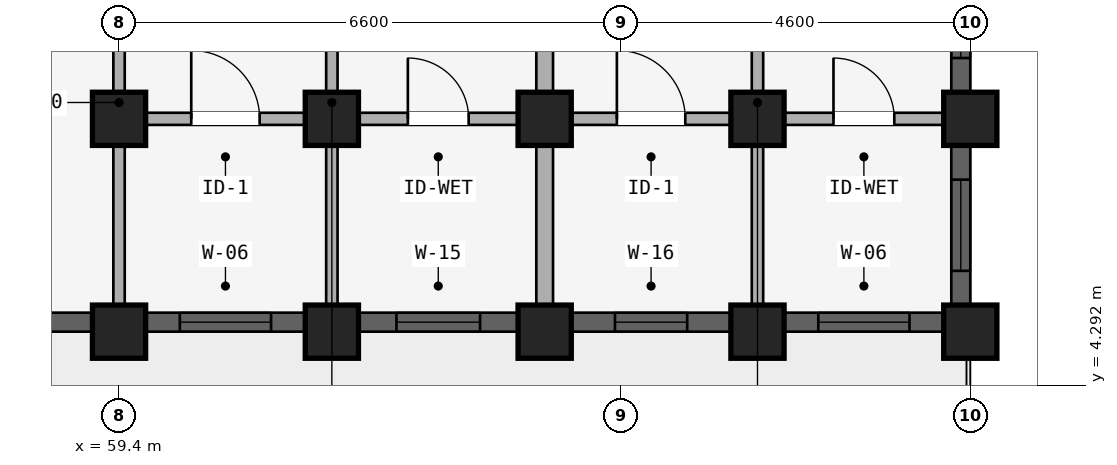
"""IFC4 building model, lengths in metres.
Left out: names, types, materials, properties, quantities, classifications, styles, units other than length and angle.
Written with IfcOpenShell. Run it as: python <this file> out.ifc"""

import sys

from ifc_helpers import new_model, si_unit, direction, frame, frame_2d, origin, origin_2d, place, context, subcontext, project, spatial, rectangle, extrude, element, fill, save


model = new_model("IFC4")
c1 = context("Model", 3, precision=1e-05, world=origin(), true_north=direction((0.0, 1.0)))
c2 = subcontext(c1, "Body", "Model", "MODEL_VIEW")
j1 = project(units=[si_unit("LENGTHUNIT", "METRE"), si_unit("PLANEANGLEUNIT", "RADIAN")], contexts=[c1])
p1 = place(None, origin())
s1 = spatial("IfcSite", under=j1, at=p1, CompositionType="ELEMENT")
p2 = place(p1, origin())
s2 = spatial("IfcBuilding", under=s1, at=p2, CompositionType="ELEMENT")
p3 = place(p2, frame((0.0, 0.0, 21.3)))
s3 = spatial("IfcBuildingStorey", under=s2, at=p3, CompositionType="ELEMENT", Elevation=21.3)
p4 = place(p3, frame((59.4, 7.8, 0.0), z_axis=(0.0, 0.0, 1.0), x_axis=(1.0, 0.0, 0.0)))
e1 = element("IfcColumn", 1, at=p4, inside=s3, PredefinedType="COLUMN", context=c2, shape_type="SweptSolid", body=[
    extrude(rectangle(XDim=0.7, YDim=0.7, at=origin_2d()), origin(), (0.0, 0.0, 1.0), 2.93),
])
p5 = place(p3, frame((59.4, 5.0, 0.0), z_axis=(0.0, 0.0, 1.0), x_axis=(1.0, 0.0, 0.0)))
e2 = element("IfcColumn", 2, at=p5, inside=s3, PredefinedType="COLUMN", context=c2, shape_type="SweptSolid", body=[
    extrude(rectangle(XDim=0.7, YDim=0.7, at=origin_2d()), origin(), (0.0, 0.0, 1.0), 2.97),
])
p6 = place(p3, frame((62.2, 7.8, 0.0), z_axis=(0.0, 0.0, 1.0), x_axis=(1.0, 0.0, 0.0)))
e3 = element("IfcColumn", 3, at=p6, inside=s3, PredefinedType="COLUMN", context=c2, shape_type="SweptSolid", body=[
    extrude(rectangle(XDim=0.7, YDim=0.7, at=origin_2d()), origin(), (0.0, 0.0, 1.0), 2.93),
])
p7 = place(p3, frame((62.2, 5.0, 0.0), z_axis=(0.0, 0.0, 1.0), x_axis=(1.0, 0.0, 0.0)))
e4 = element("IfcColumn", 4, at=p7, inside=s3, PredefinedType="COLUMN", context=c2, shape_type="SweptSolid", body=[
    extrude(rectangle(XDim=0.7, YDim=0.7, at=origin_2d()), origin(), (0.0, 0.0, 1.0), 2.97),
])
p8 = place(p3, frame((65.0, 7.8, 0.0), z_axis=(0.0, 0.0, 1.0), x_axis=(1.0, 0.0, 0.0)))
e5 = element("IfcColumn", 5, at=p8, inside=s3, PredefinedType="COLUMN", context=c2, shape_type="SweptSolid", body=[
    extrude(rectangle(XDim=0.7, YDim=0.7, at=origin_2d()), origin(), (0.0, 0.0, 1.0), 2.93),
])
p9 = place(p3, frame((65.0, 5.0, 0.0), z_axis=(0.0, 0.0, 1.0), x_axis=(1.0, 0.0, 0.0)))
e6 = element("IfcColumn", 6, at=p9, inside=s3, PredefinedType="COLUMN", context=c2, shape_type="SweptSolid", body=[
    extrude(rectangle(XDim=0.7, YDim=0.7, at=origin_2d()), origin(), (0.0, 0.0, 1.0), 2.97),
])
p10 = place(p3, frame((67.8, 7.8, 0.0), z_axis=(0.0, 0.0, 1.0), x_axis=(1.0, 0.0, 0.0)))
e7 = element("IfcColumn", 7, at=p10, inside=s3, PredefinedType="COLUMN", context=c2, shape_type="SweptSolid", body=[
    extrude(rectangle(XDim=0.7, YDim=0.7, at=origin_2d()), origin(), (0.0, 0.0, 1.0), 2.93),
])
p11 = place(p3, frame((67.8, 5.0, 0.0), z_axis=(0.0, 0.0, 1.0), x_axis=(1.0, 0.0, 0.0)))
e8 = element("IfcColumn", 8, at=p11, inside=s3, PredefinedType="COLUMN", context=c2, shape_type="SweptSolid", body=[
    extrude(rectangle(XDim=0.7, YDim=0.7, at=origin_2d()), origin(), (0.0, 0.0, 1.0), 2.97),
])
p12 = place(p3, frame((70.6, 7.8, 0.0), z_axis=(0.0, 0.0, 1.0), x_axis=(1.0, 0.0, 0.0)))
e9 = element("IfcColumn", 9, at=p12, inside=s3, PredefinedType="COLUMN", context=c2, shape_type="SweptSolid", body=[
    extrude(rectangle(XDim=0.7, YDim=0.7, at=origin_2d()), origin(), (0.0, 0.0, 1.0), 2.93),
])
p13 = place(p3, frame((70.6, 5.0, 0.0), z_axis=(0.0, 0.0, 1.0), x_axis=(1.0, 0.0, 0.0)))
e10 = element("IfcColumn", 10, at=p13, inside=s3, PredefinedType="COLUMN", context=c2, shape_type="SweptSolid", body=[
    extrude(rectangle(XDim=0.7, YDim=0.7, at=origin_2d()), origin(), (0.0, 0.0, 1.0), 2.97),
])
p14 = place(p3, frame((59.48, 7.8, 0.0), z_axis=(0.0, 0.0, 1.0), x_axis=(1.0, 0.0, 0.0)))
e11 = element("IfcWall", 11, at=p14, inside=s3, PredefinedType="PLUMBINGWALL", context=c2, shape_type="SweptSolid", body=[
    extrude(rectangle(XDim=2.64, YDim=0.16, at=frame_2d((1.32, 0.0))), origin(), (0.0, 0.0, 1.0), 2.372),
])
p15 = place(p14, frame((0.87, 0.0, 0.0)))
e12 = element("IfcOpeningElement", 12, at=p15, cuts=e11, PredefinedType="OPENING", context=c2, shape_type="SweptSolid", body=[
    extrude(rectangle(XDim=0.9, YDim=2.1, at=frame_2d((0.45, 1.05))), frame((0.0, 0.09, 0.0), z_axis=(0.0, -1.0, 0.0), x_axis=(1.0, 0.0, 0.0)), (0.0, 0.0, 1.0), 0.18),
])
p16 = place(p3, frame((62.28, 7.8, 0.0), z_axis=(0.0, 0.0, 1.0), x_axis=(1.0, 0.0, 0.0)))
e13 = element("IfcWall", 13, at=p16, inside=s3, PredefinedType="PLUMBINGWALL", context=c2, shape_type="SweptSolid", body=[
    extrude(rectangle(XDim=2.64, YDim=0.16, at=frame_2d((1.32, 0.0))), origin(), (0.0, 0.0, 1.0), 2.372),
])
p17 = place(p16, frame((0.92, 0.0, 0.0)))
e14 = element("IfcOpeningElement", 14, at=p17, cuts=e13, PredefinedType="OPENING", context=c2, shape_type="SweptSolid", body=[
    extrude(rectangle(XDim=0.8, YDim=2.1, at=frame_2d((0.4, 1.05))), frame((0.0, 0.09, 0.0), z_axis=(0.0, -1.0, 0.0), x_axis=(1.0, 0.0, 0.0)), (0.0, 0.0, 1.0), 0.18),
])
p18 = place(p3, frame((65.08, 7.8, 0.0), z_axis=(0.0, 0.0, 1.0), x_axis=(1.0, 0.0, 0.0)))
e15 = element("IfcWall", 15, at=p18, inside=s3, PredefinedType="PLUMBINGWALL", context=c2, shape_type="SweptSolid", body=[
    extrude(rectangle(XDim=2.64, YDim=0.16, at=frame_2d((1.32, 0.0))), origin(), (0.0, 0.0, 1.0), 2.372),
])
p19 = place(p18, frame((0.87, 0.0, 0.0)))
e16 = element("IfcOpeningElement", 16, at=p19, cuts=e15, PredefinedType="OPENING", context=c2, shape_type="SweptSolid", body=[
    extrude(rectangle(XDim=0.9, YDim=2.1, at=frame_2d((0.45, 1.05))), frame((0.0, 0.09, 0.0), z_axis=(0.0, -1.0, 0.0), x_axis=(1.0, 0.0, 0.0)), (0.0, 0.0, 1.0), 0.18),
])
p20 = place(p3, frame((67.88, 7.8, 0.0), z_axis=(0.0, 0.0, 1.0), x_axis=(1.0, 0.0, 0.0)))
e17 = element("IfcWall", 17, at=p20, inside=s3, PredefinedType="PLUMBINGWALL", context=c2, shape_type="SweptSolid", body=[
    extrude(rectangle(XDim=2.64, YDim=0.16, at=frame_2d((1.32, 0.0))), origin(), (0.0, 0.0, 1.0), 2.372),
])
p21 = place(p20, frame((0.92, 0.0, 0.0)))
e18 = element("IfcOpeningElement", 18, at=p21, cuts=e17, PredefinedType="OPENING", context=c2, shape_type="SweptSolid", body=[
    extrude(rectangle(XDim=0.8, YDim=2.1, at=frame_2d((0.4, 1.05))), frame((0.0, 0.09, 0.0), z_axis=(0.0, -1.0, 0.0), x_axis=(1.0, 0.0, 0.0)), (0.0, 0.0, 1.0), 0.18),
])
p22 = place(p3, frame((59.4, 13.3, 0.0), z_axis=(0.0, 0.0, 1.0), x_axis=(0.0, -1.0, 0.0)))
e19 = element("IfcWall", 19, at=p22, inside=s3, PredefinedType="PARTITIONING", context=c2, shape_type="SweptSolid", body=[
    extrude(rectangle(XDim=8.02, YDim=0.15, at=frame_2d((4.01, 0.0))), origin(), (0.0, 0.0, 1.0), 2.372),
])
p23 = place(p22, frame((0.9, 0.0, 0.0)))
e20 = element("IfcOpeningElement", 20, at=p23, cuts=e19, PredefinedType="OPENING", context=c2, shape_type="SweptSolid", body=[
    extrude(rectangle(XDim=0.8, YDim=2.1, at=frame_2d((0.4, 1.05))), frame((0.0, 0.085, 0.0), z_axis=(0.0, -1.0, 0.0), x_axis=(1.0, 0.0, 0.0)), (0.0, 0.0, 1.0), 0.17),
])
p24 = place(p3, frame((62.2, 13.3, 0.0), z_axis=(0.0, 0.0, 1.0), x_axis=(0.0, -1.0, 0.0)))
e21 = element("IfcWall", 21, at=p24, inside=s3, PredefinedType="PARTITIONING", context=c2, shape_type="SweptSolid", body=[
    extrude(rectangle(XDim=8.02, YDim=0.15, at=frame_2d((4.01, 0.0))), origin(), (0.0, 0.0, 1.0), 2.372),
])
p25 = place(p24, frame((0.9, 0.0, 0.0)))
e22 = element("IfcOpeningElement", 22, at=p25, cuts=e21, PredefinedType="OPENING", context=c2, shape_type="SweptSolid", body=[
    extrude(rectangle(XDim=0.8, YDim=2.1, at=frame_2d((0.4, 1.05))), frame((0.0, 0.085, 0.0), z_axis=(0.0, -1.0, 0.0), x_axis=(1.0, 0.0, 0.0)), (0.0, 0.0, 1.0), 0.17),
])
p26 = place(p3, frame((65.0, 13.3, 0.0), z_axis=(0.0, 0.0, 1.0), x_axis=(0.0, -1.0, 0.0)))
e23 = element("IfcWall", 23, at=p26, inside=s3, PredefinedType="STANDARD", context=c2, shape_type="SweptSolid", body=[
    extrude(rectangle(XDim=8.02, YDim=0.22, at=frame_2d((4.01, 0.0))), origin(), (0.0, 0.0, 1.0), 2.372),
])
p27 = place(p3, frame((67.8, 13.3, 0.0), z_axis=(0.0, 0.0, 1.0), x_axis=(0.0, -1.0, 0.0)))
e24 = element("IfcWall", 24, at=p27, inside=s3, PredefinedType="PARTITIONING", context=c2, shape_type="SweptSolid", body=[
    extrude(rectangle(XDim=8.02, YDim=0.15, at=frame_2d((4.01, 0.0))), origin(), (0.0, 0.0, 1.0), 2.372),
])
p28 = place(p27, frame((0.9, 0.0, 0.0)))
e25 = element("IfcOpeningElement", 25, at=p28, cuts=e24, PredefinedType="OPENING", context=c2, shape_type="SweptSolid", body=[
    extrude(rectangle(XDim=0.8, YDim=2.1, at=frame_2d((0.4, 1.05))), frame((0.0, 0.085, 0.0), z_axis=(0.0, -1.0, 0.0), x_axis=(1.0, 0.0, 0.0)), (0.0, 0.0, 1.0), 0.17),
])
p29 = place(p3, frame((54.154, 5.125, 0.0), z_axis=(0.0, 0.0, 1.0), x_axis=(1.0, 0.0, 0.0)))
e26 = element("IfcWall", 26, at=p29, inside=s3, PredefinedType="STANDARD", context=c2, shape_type="SweptSolid", body=[
    extrude(rectangle(XDim=4.893, YDim=0.25, at=frame_2d((2.446, 0.0))), origin(), (0.0, 0.0, 1.0), 2.48),
])
p30 = place(p29, frame((1.771, 0.0, 0.68)))
e27 = element("IfcOpeningElement", 27, at=p30, cuts=e26, PredefinedType="OPENING", context=c2, shape_type="SweptSolid", body=[
    extrude(rectangle(XDim=1.35, YDim=1.6, at=frame_2d((0.675, 0.8))), frame((0.0, 0.135, 0.0), z_axis=(0.0, -1.0, 0.0), x_axis=(1.0, 0.0, 0.0)), (0.0, 0.0, 1.0), 0.27),
])
p31 = place(p3, frame((59.753, 5.125, 0.0), z_axis=(0.0, 0.0, 1.0), x_axis=(1.0, 0.0, 0.0)))
e28 = element("IfcWall", 28, at=p31, inside=s3, PredefinedType="STANDARD", context=c2, shape_type="SweptSolid", body=[
    extrude(rectangle(XDim=2.093, YDim=0.25, at=frame_2d((1.046, 0.0))), origin(), (0.0, 0.0, 1.0), 2.48),
])
p32 = place(p31, frame((0.447, 0.0, 0.78)))
e29 = element("IfcOpeningElement", 29, at=p32, cuts=e28, PredefinedType="OPENING", context=c2, shape_type="SweptSolid", body=[
    extrude(rectangle(XDim=1.2, YDim=1.5, at=frame_2d((0.6, 0.75))), frame((0.0, 0.135, 0.0), z_axis=(0.0, -1.0, 0.0), x_axis=(1.0, 0.0, 0.0)), (0.0, 0.0, 1.0), 0.27),
])
p33 = place(p3, frame((62.553, 5.125, 0.0), z_axis=(0.0, 0.0, 1.0), x_axis=(1.0, 0.0, 0.0)))
e30 = element("IfcWall", 30, at=p33, inside=s3, PredefinedType="STANDARD", context=c2, shape_type="SweptSolid", body=[
    extrude(rectangle(XDim=2.093, YDim=0.25, at=frame_2d((1.046, 0.0))), origin(), (0.0, 0.0, 1.0), 2.48),
])
p34 = place(p33, frame((0.497, 0.0, 0.83)))
e31 = element("IfcOpeningElement", 31, at=p34, cuts=e30, PredefinedType="OPENING", context=c2, shape_type="SweptSolid", body=[
    extrude(rectangle(XDim=1.1, YDim=1.45, at=frame_2d((0.55, 0.725))), frame((0.0, 0.135, 0.0), z_axis=(0.0, -1.0, 0.0), x_axis=(1.0, 0.0, 0.0)), (0.0, 0.0, 1.0), 0.27),
])
p35 = place(p3, frame((65.354, 5.125, 0.0), z_axis=(0.0, 0.0, 1.0), x_axis=(1.0, 0.0, 0.0)))
e32 = element("IfcWall", 32, at=p35, inside=s3, PredefinedType="STANDARD", context=c2, shape_type="SweptSolid", body=[
    extrude(rectangle(XDim=2.093, YDim=0.25, at=frame_2d((1.046, 0.0))), origin(), (0.0, 0.0, 1.0), 2.48),
])
p36 = place(p35, frame((0.572, 0.0, 0.88)))
e33 = element("IfcOpeningElement", 33, at=p36, cuts=e32, PredefinedType="OPENING", context=c2, shape_type="SweptSolid", body=[
    extrude(rectangle(XDim=0.95, YDim=1.35, at=frame_2d((0.475, 0.675))), frame((0.0, 0.135, 0.0), z_axis=(0.0, -1.0, 0.0), x_axis=(1.0, 0.0, 0.0)), (0.0, 0.0, 1.0), 0.27),
])
p37 = place(p3, frame((68.154, 5.125, 0.0), z_axis=(0.0, 0.0, 1.0), x_axis=(1.0, 0.0, 0.0)))
e34 = element("IfcWall", 34, at=p37, inside=s3, PredefinedType="STANDARD", context=c2, shape_type="SweptSolid", body=[
    extrude(rectangle(XDim=2.093, YDim=0.25, at=frame_2d((1.046, 0.0))), origin(), (0.0, 0.0, 1.0), 2.48),
])
p38 = place(p37, frame((0.447, 0.0, 0.78)))
e35 = element("IfcOpeningElement", 35, at=p38, cuts=e34, PredefinedType="OPENING", context=c2, shape_type="SweptSolid", body=[
    extrude(rectangle(XDim=1.2, YDim=1.5, at=frame_2d((0.6, 0.75))), frame((0.0, 0.135, 0.0), z_axis=(0.0, -1.0, 0.0), x_axis=(1.0, 0.0, 0.0)), (0.0, 0.0, 1.0), 0.27),
])
p39 = place(p3, frame((70.475, 10.247, 0.0), z_axis=(0.0, 0.0, 1.0), x_axis=(0.0, -1.0, 0.0)))
e36 = element("IfcWall", 36, at=p39, inside=s3, PredefinedType="STANDARD", context=c2, shape_type="SweptSolid", body=[
    extrude(rectangle(XDim=2.093, YDim=0.25, at=frame_2d((1.046, 0.0))), origin(), (0.0, 0.0, 1.0), 2.372),
])
p40 = place(p39, frame((0.447, 0.0, 0.672)))
e37 = element("IfcOpeningElement", 37, at=p40, cuts=e36, PredefinedType="OPENING", context=c2, shape_type="SweptSolid", body=[
    extrude(rectangle(XDim=1.2, YDim=1.5, at=frame_2d((0.6, 0.75))), frame((0.0, 0.135, 0.0), z_axis=(0.0, -1.0, 0.0), x_axis=(1.0, 0.0, 0.0)), (0.0, 0.0, 1.0), 0.27),
])
p41 = place(p3, frame((70.475, 7.447, 0.0), z_axis=(0.0, 0.0, 1.0), x_axis=(0.0, -1.0, 0.0)))
e38 = element("IfcWall", 38, at=p41, inside=s3, PredefinedType="STANDARD", context=c2, shape_type="SweptSolid", body=[
    extrude(rectangle(XDim=2.093, YDim=0.25, at=frame_2d((1.046, 0.0))), origin(), (0.0, 0.0, 1.0), 2.412),
])
p42 = place(p41, frame((0.447, 0.0, 0.712)))
e39 = element("IfcOpeningElement", 39, at=p42, cuts=e38, PredefinedType="OPENING", context=c2, shape_type="SweptSolid", body=[
    extrude(rectangle(XDim=1.2, YDim=1.5, at=frame_2d((0.6, 0.75))), frame((0.0, 0.135, 0.0), z_axis=(0.0, -1.0, 0.0), x_axis=(1.0, 0.0, 0.0)), (0.0, 0.0, 1.0), 0.27),
])
p43 = place(p32, origin())
e40 = element("IfcWindow", 40, at=p43, inside=s3, PartitioningType="SINGLE_PANEL", PredefinedType="WINDOW", context=c2, shape_type="SweptSolid", body=[
    extrude(rectangle(XDim=1.2, YDim=1.5, at=frame_2d((0.6, 0.75))), frame((0.0, 0.03, 0.0), z_axis=(0.0, -1.0, 0.0), x_axis=(1.0, 0.0, 0.0)), (0.0, 0.0, 1.0), 0.06),
])
fill(e29, e40)
p44 = place(p34, origin())
e41 = element("IfcWindow", 41, at=p44, inside=s3, PartitioningType="SINGLE_PANEL", PredefinedType="WINDOW", context=c2, shape_type="SweptSolid", body=[
    extrude(rectangle(XDim=1.1, YDim=1.45, at=frame_2d((0.55, 0.725))), frame((0.0, 0.03, 0.0), z_axis=(0.0, -1.0, 0.0), x_axis=(1.0, 0.0, 0.0)), (0.0, 0.0, 1.0), 0.06),
])
fill(e31, e41)
p45 = place(p36, origin())
e42 = element("IfcWindow", 42, at=p45, inside=s3, PartitioningType="SINGLE_PANEL", PredefinedType="WINDOW", context=c2, shape_type="SweptSolid", body=[
    extrude(rectangle(XDim=0.95, YDim=1.35, at=frame_2d((0.475, 0.675))), frame((0.0, 0.03, 0.0), z_axis=(0.0, -1.0, 0.0), x_axis=(1.0, 0.0, 0.0)), (0.0, 0.0, 1.0), 0.06),
])
fill(e33, e42)
p46 = place(p38, origin())
e43 = element("IfcWindow", 43, at=p46, inside=s3, PartitioningType="SINGLE_PANEL", PredefinedType="WINDOW", context=c2, shape_type="SweptSolid", body=[
    extrude(rectangle(XDim=1.2, YDim=1.5, at=frame_2d((0.6, 0.75))), frame((0.0, 0.03, 0.0), z_axis=(0.0, -1.0, 0.0), x_axis=(1.0, 0.0, 0.0)), (0.0, 0.0, 1.0), 0.06),
])
fill(e35, e43)
p47 = place(p40, origin())
e44 = element("IfcWindow", 44, at=p47, inside=s3, PartitioningType="SINGLE_PANEL", PredefinedType="WINDOW", context=c2, shape_type="SweptSolid", body=[
    extrude(rectangle(XDim=1.2, YDim=1.5, at=frame_2d((0.6, 0.75))), frame((0.0, 0.03, 0.0), z_axis=(0.0, -1.0, 0.0), x_axis=(1.0, 0.0, 0.0)), (0.0, 0.0, 1.0), 0.06),
])
fill(e37, e44)
p48 = place(p42, origin())
e45 = element("IfcWindow", 45, at=p48, inside=s3, PartitioningType="SINGLE_PANEL", PredefinedType="WINDOW", context=c2, shape_type="SweptSolid", body=[
    extrude(rectangle(XDim=1.2, YDim=1.5, at=frame_2d((0.6, 0.75))), frame((0.0, 0.03, 0.0), z_axis=(0.0, -1.0, 0.0), x_axis=(1.0, 0.0, 0.0)), (0.0, 0.0, 1.0), 0.06),
])
fill(e39, e45)
p49 = place(p15, origin())
e46 = element("IfcDoor", 46, at=p49, inside=s3, OperationType="SINGLE_SWING_LEFT", PredefinedType="DOOR", context=c2, shape_type="SweptSolid", body=[
    extrude(rectangle(XDim=0.9, YDim=2.1, at=frame_2d((0.45, 1.05))), frame((0.0, 0.025, 0.0), z_axis=(0.0, -1.0, 0.0), x_axis=(1.0, 0.0, 0.0)), (0.0, 0.0, 1.0), 0.05),
])
fill(e12, e46)
p50 = place(p17, origin())
e47 = element("IfcDoor", 47, at=p50, inside=s3, OperationType="SINGLE_SWING_LEFT", PredefinedType="DOOR", context=c2, shape_type="SweptSolid", body=[
    extrude(rectangle(XDim=0.8, YDim=2.1, at=frame_2d((0.4, 1.05))), frame((0.0, 0.025, 0.0), z_axis=(0.0, -1.0, 0.0), x_axis=(1.0, 0.0, 0.0)), (0.0, 0.0, 1.0), 0.05),
])
fill(e14, e47)
p51 = place(p19, origin())
e48 = element("IfcDoor", 48, at=p51, inside=s3, OperationType="SINGLE_SWING_LEFT", PredefinedType="DOOR", context=c2, shape_type="SweptSolid", body=[
    extrude(rectangle(XDim=0.9, YDim=2.1, at=frame_2d((0.45, 1.05))), frame((0.0, 0.025, 0.0), z_axis=(0.0, -1.0, 0.0), x_axis=(1.0, 0.0, 0.0)), (0.0, 0.0, 1.0), 0.05),
])
fill(e16, e48)
p52 = place(p21, origin())
e49 = element("IfcDoor", 49, at=p52, inside=s3, OperationType="SINGLE_SWING_LEFT", PredefinedType="DOOR", context=c2, shape_type="SweptSolid", body=[
    extrude(rectangle(XDim=0.8, YDim=2.1, at=frame_2d((0.4, 1.05))), frame((0.0, 0.025, 0.0), z_axis=(0.0, -1.0, 0.0), x_axis=(1.0, 0.0, 0.0)), (0.0, 0.0, 1.0), 0.05),
])
fill(e18, e49)
save(model, sys.argv[1])
